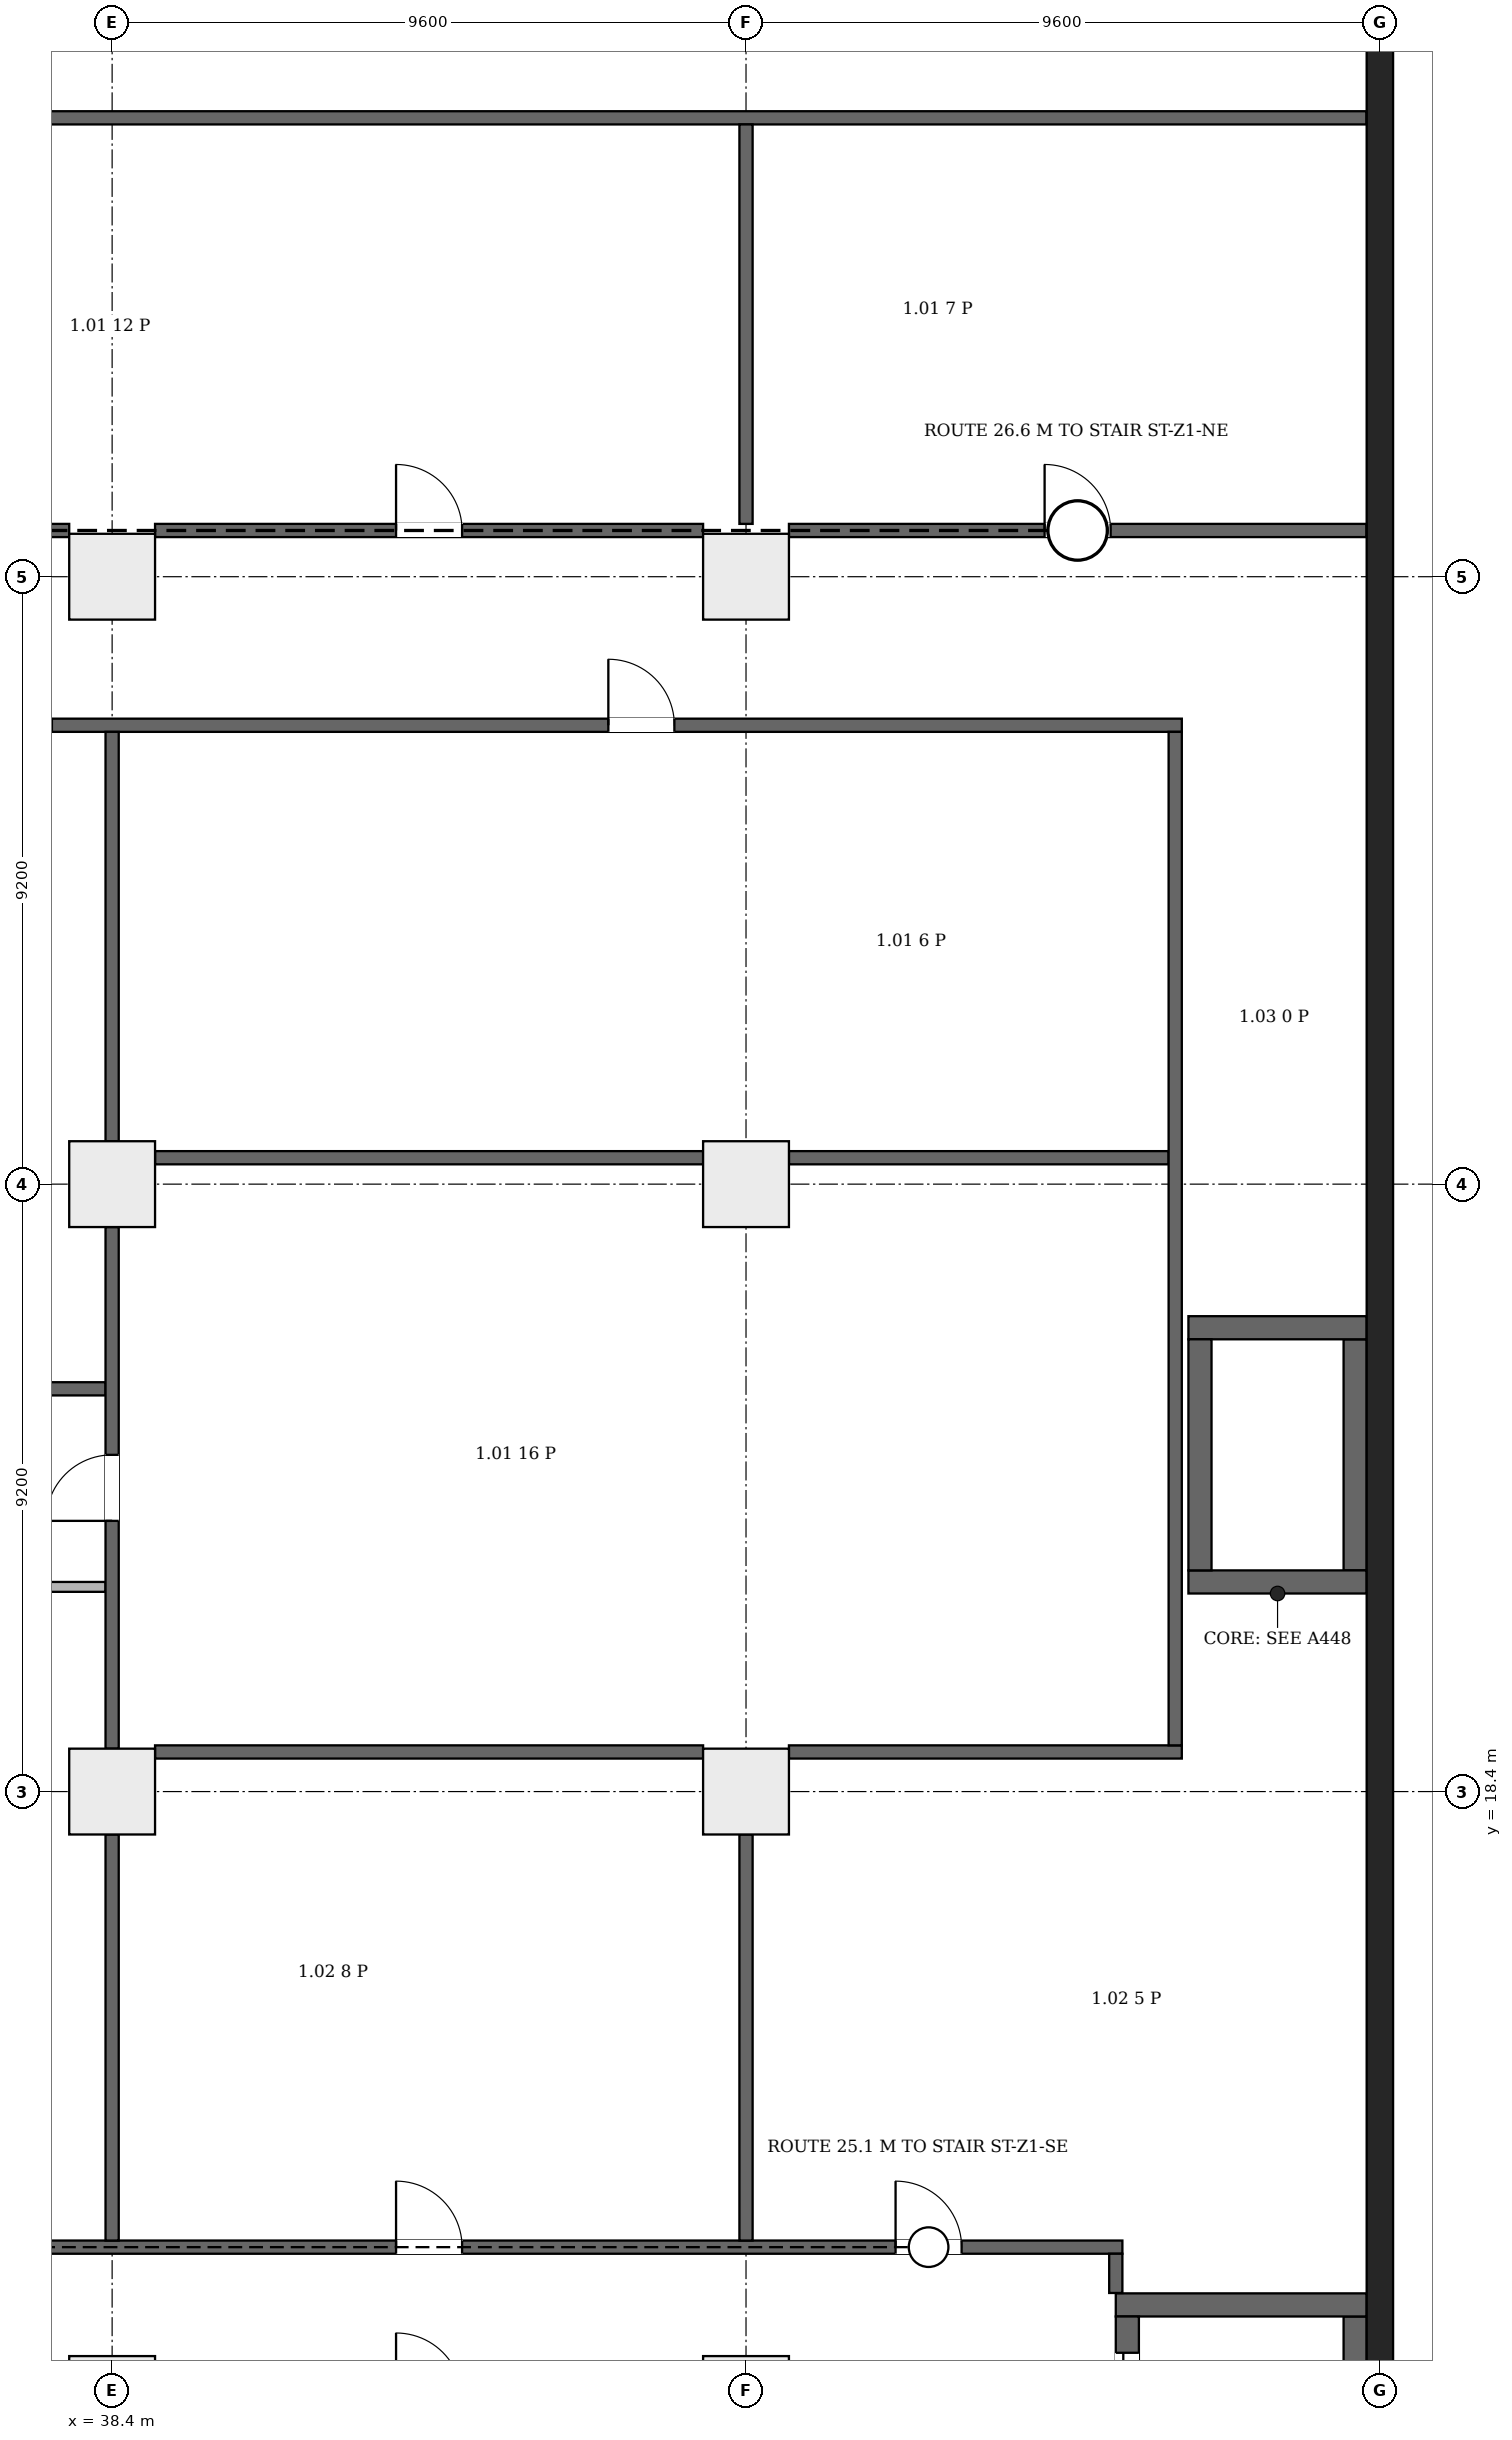
"""IFC4 building model, lengths in metres.
Left out: names, types, materials, properties, quantities, classifications, styles, units other than length and angle.
Written with IfcOpenShell. Run it as: python <this file> out.ifc"""

import sys

from ifc_helpers import new_model, si_unit, direction, frame, frame_2d, origin, origin_2d, place, context, subcontext, project, spatial, rectangle, extrude, element, fill, save


model = new_model("IFC4")
c1 = context("Model", 3, precision=1e-05, world=origin(), true_north=direction((0.0, 1.0)))
c2 = subcontext(c1, "Body", "Model", "MODEL_VIEW")
j1 = project(units=[si_unit("LENGTHUNIT", "METRE"), si_unit("PLANEANGLEUNIT", "RADIAN")], contexts=[c1])
p1 = place(None, origin())
s1 = spatial("IfcSite", under=j1, at=p1, CompositionType="ELEMENT")
p2 = place(p1, origin())
s2 = spatial("IfcBuilding", under=s1, at=p2, CompositionType="ELEMENT")
p3 = place(p2, frame((0.0, 0.0, 6.5)))
s3 = spatial("IfcBuildingStorey", under=s2, at=p3, CompositionType="ELEMENT", Elevation=6.5)
p4 = place(p3, frame((57.6, -0.2, 0.0), z_axis=(0.0, 0.0, 1.0), x_axis=(0.0, 1.0, 0.0)))
e1 = element("IfcWall", 1, at=p4, inside=s3, PredefinedType="SHEAR", context=c2, shape_type="SweptSolid", body=[
    extrude(rectangle(XDim=46.88, YDim=0.4, at=frame_2d((23.44, 0.0))), origin(), (0.0, 0.0, 1.0), 7.7),
])
p5 = place(p3, frame((53.6, 10.625, 0.0), z_axis=(0.0, 0.0, 1.0), x_axis=(1.0, 0.0, 0.0)))
e2 = element("IfcWall", 2, at=p5, inside=s3, PredefinedType="SHEAR", context=c2, shape_type="SweptSolid", body=[
    extrude(rectangle(XDim=3.8, YDim=0.35, at=frame_2d((1.9, 0.0))), origin(), (0.0, 0.0, 1.0), 7.7),
])
p6 = place(p3, frame((53.775, 8.25, 0.0), z_axis=(0.0, 0.0, 1.0), x_axis=(0.0, 1.0, 0.0)))
e3 = element("IfcWall", 3, at=p6, inside=s3, PredefinedType="SHEAR", context=c2, shape_type="SweptSolid", body=[
    extrude(rectangle(XDim=2.2, YDim=0.35, at=frame_2d((1.1, 0.0))), origin(), (0.0, 0.0, 1.0), 7.7),
])
p7 = place(p6, frame((0.55, 0.0, 0.0)))
e4 = element("IfcOpeningElement", 4, at=p7, cuts=e3, PredefinedType="OPENING", context=c2, shape_type="SweptSolid", body=[
    extrude(rectangle(XDim=1.1, YDim=2.1, at=frame_2d((0.55, 1.05))), frame((0.0, 0.185, 0.0), z_axis=(0.0, -1.0, 0.0), x_axis=(1.0, 0.0, 0.0)), (0.0, 0.0, 1.0), 0.37),
])
p8 = place(p3, frame((57.225, 8.25, 0.0), z_axis=(0.0, 0.0, 1.0), x_axis=(0.0, 1.0, 0.0)))
e5 = element("IfcWall", 5, at=p8, inside=s3, PredefinedType="SHEAR", context=c2, shape_type="SweptSolid", body=[
    extrude(rectangle(XDim=2.2, YDim=0.35, at=frame_2d((1.1, 0.0))), origin(), (0.0, 0.0, 1.0), 7.7),
])
for number, where, z_axis, x_axis in (
    (6, (54.7, 21.575, 0.0), (0.0, 0.0, 1.0), (1.0, 0.0, 0.0)),
    (7, (54.7, 25.425, 0.0), (0.0, 0.0, 1.0), (1.0, 0.0, 0.0)),
):
    element("IfcWall", number, at=place(p3, frame(where, z_axis=z_axis, x_axis=x_axis)), inside=s3, PredefinedType="SHEAR", context=c2, shape_type="SweptSolid", body=[
        extrude(rectangle(XDim=2.7, YDim=0.35, at=frame_2d((1.35, 0.0))), origin(), (0.0, 0.0, 1.0), 7.7),
    ])
for number, where, z_axis, x_axis in (
    (8, (54.875, 21.75, 0.0), (0.0, 0.0, 1.0), (0.0, 1.0, 0.0)),
    (9, (57.225, 21.75, 0.0), (0.0, 0.0, 1.0), (0.0, 1.0, 0.0)),
):
    element("IfcWall", number, at=place(p3, frame(where, z_axis=z_axis, x_axis=x_axis)), inside=s3, PredefinedType="SHEAR", context=c2, shape_type="SweptSolid", body=[
        extrude(rectangle(XDim=3.5, YDim=0.35, at=frame_2d((1.75, 0.0))), origin(), (0.0, 0.0, 1.0), 7.7),
    ])
for number, where, z_axis, x_axis in (
    (10, (38.4, 9.2, 0.0), (0.0, 0.0, 1.0), (1.0, 0.0, 0.0)),
    (11, (48.0, 9.2, 0.0), (0.0, 0.0, 1.0), (1.0, 0.0, 0.0)),
    (12, (38.4, 18.4, 0.0), (0.0, 0.0, 1.0), (1.0, 0.0, 0.0)),
    (13, (48.0, 18.4, 0.0), (0.0, 0.0, 1.0), (1.0, 0.0, 0.0)),
    (14, (38.4, 27.6, 0.0), (0.0, 0.0, 1.0), (1.0, 0.0, 0.0)),
    (15, (48.0, 27.6, 0.0), (0.0, 0.0, 1.0), (1.0, 0.0, 0.0)),
    (16, (38.4, 36.8, 0.0), (0.0, 0.0, 1.0), (1.0, 0.0, 0.0)),
    (17, (48.0, 36.8, 0.0), (0.0, 0.0, 1.0), (1.0, 0.0, 0.0)),
):
    element("IfcColumn", number, at=place(p3, frame(where, z_axis=z_axis, x_axis=x_axis)), inside=s3, PredefinedType="COLUMN", context=c2, shape_type="SweptSolid", body=[
        extrude(rectangle(XDim=1.3, YDim=1.3, at=origin_2d()), origin(), (0.0, 0.0, 1.0), 7.7),
    ])
p9 = place(p3, frame((0.206, 24.5, 0.0), z_axis=(0.0, 0.0, 1.0), x_axis=(1.0, 0.0, 0.0)))
e18 = element("IfcWall", 18, at=p9, inside=s3, PredefinedType="PARTITIONING", context=c2, shape_type="SweptSolid", body=[
    extrude(rectangle(XDim=38.094, YDim=0.2, at=frame_2d((19.047, 0.0))), origin(), (0.0, 0.0, 1.0), 7.35),
])
p10 = place(p3, frame((27.206, 11.5, 0.0), z_axis=(0.0, 0.0, 1.0), x_axis=(1.0, 0.0, 0.0)))
e19 = element("IfcWall", 19, at=p10, inside=s3, PredefinedType="PARTITIONING", context=c2, shape_type="SweptSolid", body=[
    extrude(rectangle(XDim=26.494, YDim=0.2, at=frame_2d((13.247, 0.0))), origin(), (0.0, 0.0, 1.0), 7.35),
])
p11 = place(p10, frame((15.494, 0.0, 0.0)))
e20 = element("IfcOpeningElement", 20, at=p11, cuts=e19, PredefinedType="OPENING", context=c2, shape_type="SweptSolid", body=[
    extrude(rectangle(XDim=1.0, YDim=2.1, at=frame_2d((0.5, 1.05))), frame((0.0, 0.11, 0.0), z_axis=(0.0, -1.0, 0.0), x_axis=(1.0, 0.0, 0.0)), (0.0, 0.0, 1.0), 0.22),
])
p12 = place(p10, frame((23.059, 0.0, 0.0)))
e21 = element("IfcOpeningElement", 21, at=p12, cuts=e19, PredefinedType="OPENING", context=c2, shape_type="SweptSolid", body=[
    extrude(rectangle(XDim=1.0, YDim=2.1, at=frame_2d((0.5, 1.05))), frame((0.0, 0.11, 0.0), z_axis=(0.0, -1.0, 0.0), x_axis=(1.0, 0.0, 0.0)), (0.0, 0.0, 1.0), 0.22),
])
p13 = place(p3, frame((28.006, 43.75, 0.0), z_axis=(0.0, 0.0, 1.0), x_axis=(1.0, 0.0, 0.0)))
e22 = element("IfcWall", 22, at=p13, inside=s3, PredefinedType="PARTITIONING", context=c2, shape_type="SweptSolid", body=[
    extrude(rectangle(XDim=29.388, YDim=0.2, at=frame_2d((14.694, 0.0))), origin(), (0.0, 0.0, 1.0), 7.35),
])
p14 = place(p3, frame((28.925, 21.5, 0.0), z_axis=(0.0, 0.0, 1.0), x_axis=(1.0, 0.0, 0.0)))
e23 = element("IfcWall", 23, at=p14, inside=s3, PredefinedType="PARTITIONING", context=c2, shape_type="SweptSolid", body=[
    extrude(rectangle(XDim=9.375, YDim=0.15, at=frame_2d((4.688, 0.0))), origin(), (0.0, 0.0, 1.0), 7.35),
])
p15 = place(p14, frame((4.187, 0.0, 0.0)))
e24 = element("IfcOpeningElement", 24, at=p15, cuts=e23, PredefinedType="OPENING", context=c2, shape_type="SweptSolid", body=[
    extrude(rectangle(XDim=1.0, YDim=2.1, at=frame_2d((0.5, 1.05))), frame((0.0, 0.085, 0.0), z_axis=(0.0, -1.0, 0.0), x_axis=(1.0, 0.0, 0.0)), (0.0, 0.0, 1.0), 0.17),
])
p16 = place(p3, frame((29.9, 37.5, 0.0), z_axis=(0.0, 0.0, 1.0), x_axis=(1.0, 0.0, 0.0)))
e25 = element("IfcWall", 25, at=p16, inside=s3, PredefinedType="PARTITIONING", context=c2, shape_type="SweptSolid", body=[
    extrude(rectangle(XDim=7.85, YDim=0.2, at=frame_2d((3.925, 0.0))), origin(), (0.0, 0.0, 1.0), 7.35),
])
p17 = place(p3, frame((35.406, 34.55, 0.0), z_axis=(0.0, 0.0, 1.0), x_axis=(1.0, 0.0, 0.0)))
e26 = element("IfcWall", 26, at=p17, inside=s3, PredefinedType="PARTITIONING", context=c2, shape_type="SweptSolid", body=[
    extrude(rectangle(XDim=19.194, YDim=0.2, at=frame_2d((9.597, 0.0))), origin(), (0.0, 0.0, 1.0), 7.35),
])
p18 = place(p17, frame((1.082, 0.0, 0.0)))
e27 = element("IfcOpeningElement", 27, at=p18, cuts=e26, PredefinedType="OPENING", context=c2, shape_type="SweptSolid", body=[
    extrude(rectangle(XDim=1.0, YDim=2.1, at=frame_2d((0.5, 1.05))), frame((0.0, 0.11, 0.0), z_axis=(0.0, -1.0, 0.0), x_axis=(1.0, 0.0, 0.0)), (0.0, 0.0, 1.0), 0.22),
])
p19 = place(p17, frame((10.509, 0.0, 0.0)))
e28 = element("IfcOpeningElement", 28, at=p19, cuts=e26, PredefinedType="OPENING", context=c2, shape_type="SweptSolid", body=[
    extrude(rectangle(XDim=1.0, YDim=2.1, at=frame_2d((0.5, 1.05))), frame((0.0, 0.11, 0.0), z_axis=(0.0, -1.0, 0.0), x_axis=(1.0, 0.0, 0.0)), (0.0, 0.0, 1.0), 0.22),
])
p20 = place(p3, frame((38.4, 11.6, 0.0), z_axis=(0.0, 0.0, 1.0), x_axis=(0.0, 1.0, 0.0)))
e29 = element("IfcWall", 29, at=p20, inside=s3, PredefinedType="PARTITIONING", context=c2, shape_type="SweptSolid", body=[
    extrude(rectangle(XDim=6.15, YDim=0.2, at=frame_2d((3.075, 0.0))), origin(), (0.0, 0.0, 1.0), 6.95),
])
p21 = place(p3, frame((38.4, 19.05, 0.0), z_axis=(0.0, 0.0, 1.0), x_axis=(0.0, 1.0, 0.0)))
e30 = element("IfcWall", 30, at=p21, inside=s3, PredefinedType="PARTITIONING", context=c2, shape_type="SweptSolid", body=[
    extrude(rectangle(XDim=7.9, YDim=0.2, at=frame_2d((3.95, 0.0))), origin(), (0.0, 0.0, 1.0), 6.95),
])
p22 = place(p21, frame((3.45, 0.0, 0.0)))
e31 = element("IfcOpeningElement", 31, at=p22, cuts=e30, PredefinedType="OPENING", context=c2, shape_type="SweptSolid", body=[
    extrude(rectangle(XDim=1.0, YDim=2.1, at=frame_2d((0.5, 1.05))), frame((0.0, 0.11, 0.0), z_axis=(0.0, -1.0, 0.0), x_axis=(1.0, 0.0, 0.0)), (0.0, 0.0, 1.0), 0.22),
])
p23 = place(p3, frame((38.4, 28.25, 0.0), z_axis=(0.0, 0.0, 1.0), x_axis=(0.0, 1.0, 0.0)))
e32 = element("IfcWall", 32, at=p23, inside=s3, PredefinedType="PARTITIONING", context=c2, shape_type="SweptSolid", body=[
    extrude(rectangle(XDim=6.2, YDim=0.2, at=frame_2d((3.1, 0.0))), origin(), (0.0, 0.0, 1.0), 6.95),
])
for number, where, z_axis, x_axis in (
    (33, (39.05, 19.0, 0.0), (0.0, 0.0, 1.0), (1.0, 0.0, 0.0)),
    (34, (39.05, 28.0, 0.0), (0.0, 0.0, 1.0), (1.0, 0.0, 0.0)),
):
    element("IfcWall", number, at=place(p3, frame(where, z_axis=z_axis, x_axis=x_axis)), inside=s3, PredefinedType="PARTITIONING", context=c2, shape_type="SweptSolid", body=[
        extrude(rectangle(XDim=8.3, YDim=0.2, at=frame_2d((4.15, 0.0))), origin(), (0.0, 0.0, 1.0), 7.35),
    ])
p24 = place(p3, frame((39.05, 37.5, 0.0), z_axis=(0.0, 0.0, 1.0), x_axis=(1.0, 0.0, 0.0)))
e35 = element("IfcWall", 35, at=p24, inside=s3, PredefinedType="PARTITIONING", context=c2, shape_type="SweptSolid", body=[
    extrude(rectangle(XDim=8.3, YDim=0.2, at=frame_2d((4.15, 0.0))), origin(), (0.0, 0.0, 1.0), 7.35),
])
p25 = place(p24, frame((3.65, 0.0, 0.0)))
e36 = element("IfcOpeningElement", 36, at=p25, cuts=e35, PredefinedType="OPENING", context=c2, shape_type="SweptSolid", body=[
    extrude(rectangle(XDim=1.0, YDim=2.1, at=frame_2d((0.5, 1.05))), frame((0.0, 0.11, 0.0), z_axis=(0.0, -1.0, 0.0), x_axis=(1.0, 0.0, 0.0)), (0.0, 0.0, 1.0), 0.22),
])
p26 = place(p3, frame((48.0, 11.6, 0.0), z_axis=(0.0, 0.0, 1.0), x_axis=(0.0, 1.0, 0.0)))
e37 = element("IfcWall", 37, at=p26, inside=s3, PredefinedType="PARTITIONING", context=c2, shape_type="SweptSolid", body=[
    extrude(rectangle(XDim=6.15, YDim=0.2, at=frame_2d((3.075, 0.0))), origin(), (0.0, 0.0, 1.0), 6.95),
])
p27 = place(p3, frame((48.0, 37.6, 0.0), z_axis=(0.0, 0.0, 1.0), x_axis=(0.0, 1.0, 0.0)))
e38 = element("IfcWall", 38, at=p27, inside=s3, PredefinedType="PARTITIONING", context=c2, shape_type="SweptSolid", body=[
    extrude(rectangle(XDim=6.05, YDim=0.2, at=frame_2d((3.025, 0.0))), origin(), (0.0, 0.0, 1.0), 6.95),
])
p28 = place(p3, frame((48.65, 19.0, 0.0), z_axis=(0.0, 0.0, 1.0), x_axis=(1.0, 0.0, 0.0)))
e39 = element("IfcWall", 39, at=p28, inside=s3, PredefinedType="PARTITIONING", context=c2, shape_type="SweptSolid", body=[
    extrude(rectangle(XDim=5.95, YDim=0.2, at=frame_2d((2.975, 0.0))), origin(), (0.0, 0.0, 1.0), 7.35),
])
p29 = place(p3, frame((48.65, 28.0, 0.0), z_axis=(0.0, 0.0, 1.0), x_axis=(1.0, 0.0, 0.0)))
e40 = element("IfcWall", 40, at=p29, inside=s3, PredefinedType="PARTITIONING", context=c2, shape_type="SweptSolid", body=[
    extrude(rectangle(XDim=5.75, YDim=0.2, at=frame_2d((2.875, 0.0))), origin(), (0.0, 0.0, 1.0), 7.35),
])
p30 = place(p3, frame((48.65, 37.5, 0.0), z_axis=(0.0, 0.0, 1.0), x_axis=(1.0, 0.0, 0.0)))
e41 = element("IfcWall", 41, at=p30, inside=s3, PredefinedType="PARTITIONING", context=c2, shape_type="SweptSolid", body=[
    extrude(rectangle(XDim=8.744, YDim=0.2, at=frame_2d((4.372, 0.0))), origin(), (0.0, 0.0, 1.0), 7.35),
])
p31 = place(p30, frame((3.872, 0.0, 0.0)))
e42 = element("IfcOpeningElement", 42, at=p31, cuts=e41, PredefinedType="OPENING", context=c2, shape_type="SweptSolid", body=[
    extrude(rectangle(XDim=1.0, YDim=2.1, at=frame_2d((0.5, 1.05))), frame((0.0, 0.11, 0.0), z_axis=(0.0, -1.0, 0.0), x_axis=(1.0, 0.0, 0.0)), (0.0, 0.0, 1.0), 0.22),
])
p32 = place(p3, frame((53.6, 10.806, 0.0), z_axis=(0.0, 0.0, 1.0), x_axis=(0.0, 1.0, 0.0)))
e43 = element("IfcWall", 43, at=p32, inside=s3, PredefinedType="PARTITIONING", context=c2, shape_type="SweptSolid", body=[
    extrude(rectangle(XDim=0.594, YDim=0.2, at=frame_2d((0.297, 0.0))), origin(), (0.0, 0.0, 1.0), 7.35),
])
p33 = place(p3, frame((54.5, 19.1, 0.0), z_axis=(0.0, 0.0, 1.0), x_axis=(0.0, 1.0, 0.0)))
e44 = element("IfcWall", 44, at=p33, inside=s3, PredefinedType="PARTITIONING", context=c2, shape_type="SweptSolid", body=[
    extrude(rectangle(XDim=15.35, YDim=0.2, at=frame_2d((7.675, 0.0))), origin(), (0.0, 0.0, 1.0), 7.35),
])
p34 = place(p7, origin())
e45 = element("IfcDoor", 45, at=p34, inside=s3, OperationType="DOUBLE_DOOR_SLIDING", PredefinedType="DOOR", context=c2, shape_type="SweptSolid", body=[
    extrude(rectangle(XDim=1.1, YDim=2.1, at=frame_2d((0.55, 1.05))), frame((0.0, 0.025, 0.0), z_axis=(0.0, -1.0, 0.0), x_axis=(1.0, 0.0, 0.0)), (0.0, 0.0, 1.0), 0.05),
])
fill(e4, e45)
p35 = place(p11, origin())
e46 = element("IfcDoor", 46, at=p35, inside=s3, OperationType="SINGLE_SWING_RIGHT", PredefinedType="DOOR", context=c2, shape_type="SweptSolid", body=[
    extrude(rectangle(XDim=1.0, YDim=2.1, at=frame_2d((0.5, 1.05))), frame((0.0, 0.025, 0.0), z_axis=(0.0, -1.0, 0.0), x_axis=(1.0, 0.0, 0.0)), (0.0, 0.0, 1.0), 0.05),
])
fill(e20, e46)
p36 = place(p12, origin())
e47 = element("IfcDoor", 47, at=p36, inside=s3, OperationType="SINGLE_SWING_LEFT", PredefinedType="DOOR", context=c2, shape_type="SweptSolid", body=[
    extrude(rectangle(XDim=1.0, YDim=2.1, at=frame_2d((0.5, 1.05))), frame((0.0, 0.025, 0.0), z_axis=(0.0, -1.0, 0.0), x_axis=(1.0, 0.0, 0.0)), (0.0, 0.0, 1.0), 0.05),
])
fill(e21, e47)
p37 = place(p22, origin())
e48 = element("IfcDoor", 48, at=p37, inside=s3, OperationType="SINGLE_SWING_LEFT", PredefinedType="DOOR", context=c2, shape_type="SweptSolid", body=[
    extrude(rectangle(XDim=1.0, YDim=2.1, at=frame_2d((0.5, 1.05))), frame((0.0, 0.025, 0.0), z_axis=(0.0, -1.0, 0.0), x_axis=(1.0, 0.0, 0.0)), (0.0, 0.0, 1.0), 0.05),
])
fill(e31, e48)
p38 = place(p19, origin())
e49 = element("IfcDoor", 49, at=p38, inside=s3, OperationType="SINGLE_SWING_RIGHT", PredefinedType="DOOR", context=c2, shape_type="SweptSolid", body=[
    extrude(rectangle(XDim=1.0, YDim=2.1, at=frame_2d((0.5, 1.05))), frame((0.0, 0.025, 0.0), z_axis=(0.0, -1.0, 0.0), x_axis=(1.0, 0.0, 0.0)), (0.0, 0.0, 1.0), 0.05),
])
fill(e28, e49)
p39 = place(p25, origin())
e50 = element("IfcDoor", 50, at=p39, inside=s3, OperationType="SINGLE_SWING_LEFT", PredefinedType="DOOR", context=c2, shape_type="SweptSolid", body=[
    extrude(rectangle(XDim=1.0, YDim=2.1, at=frame_2d((0.5, 1.05))), frame((0.0, 0.025, 0.0), z_axis=(0.0, -1.0, 0.0), x_axis=(1.0, 0.0, 0.0)), (0.0, 0.0, 1.0), 0.05),
])
fill(e36, e50)
p40 = place(p31, origin())
e51 = element("IfcDoor", 51, at=p40, inside=s3, OperationType="SINGLE_SWING_LEFT", PredefinedType="DOOR", context=c2, shape_type="SweptSolid", body=[
    extrude(rectangle(XDim=1.0, YDim=2.1, at=frame_2d((0.5, 1.05))), frame((0.0, 0.025, 0.0), z_axis=(0.0, -1.0, 0.0), x_axis=(1.0, 0.0, 0.0)), (0.0, 0.0, 1.0), 0.05),
])
fill(e42, e51)
save(model, sys.argv[1])
